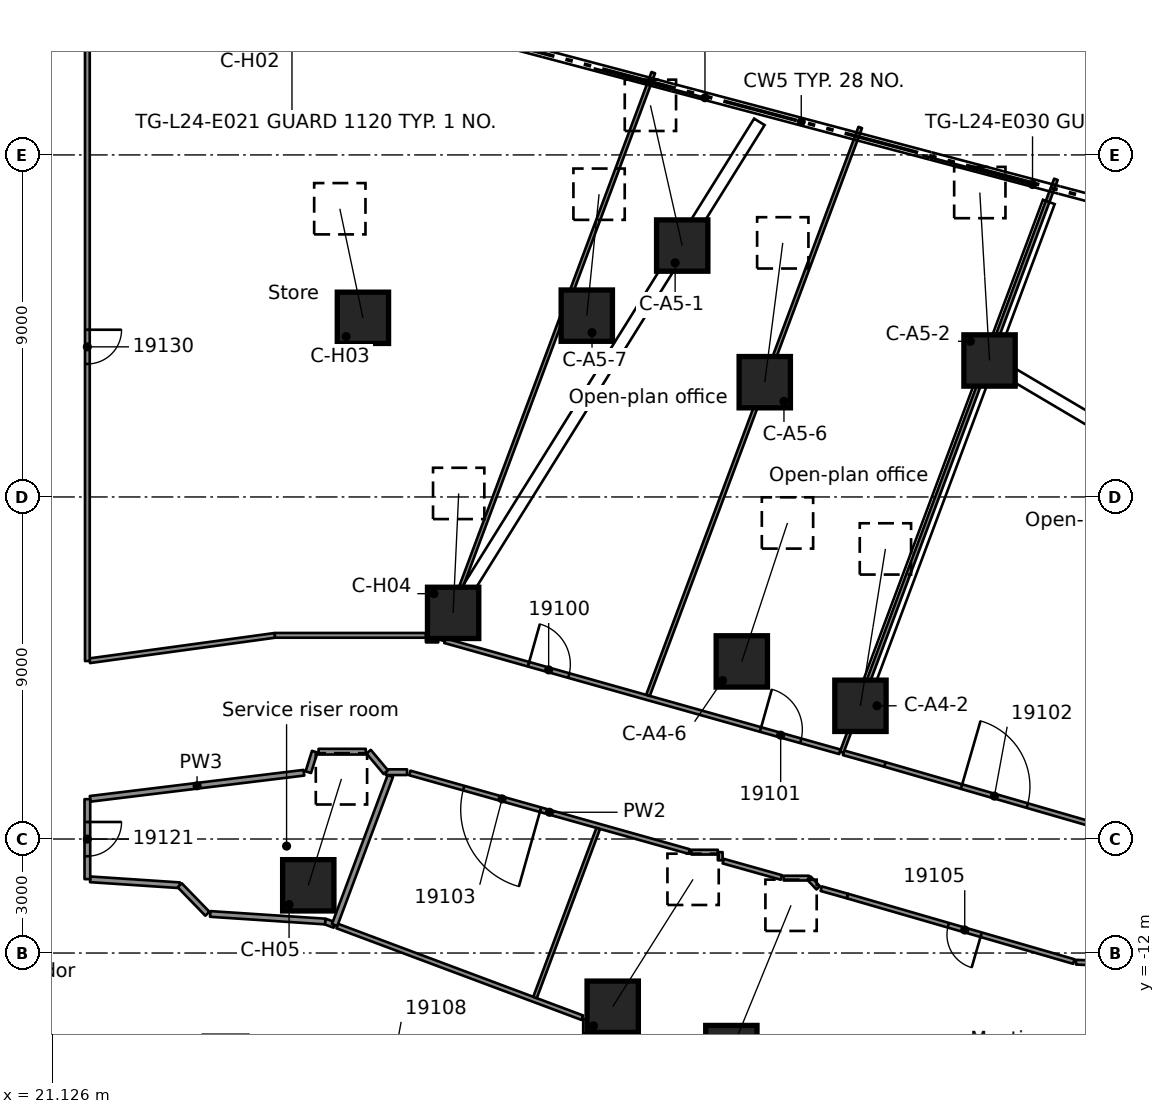
"""IFC4 building model, lengths in metres.
Left out: names, types, materials, properties, quantities, classifications, styles, units other than length and angle.
Written with IfcOpenShell. Run it as: python <this file> out.ifc"""

import sys

from ifc_helpers import new_model, si_unit, direction, frame, frame_2d, origin, origin_2d, place, context, subcontext, project, spatial, rectangle, extrude, element, fill, save


model = new_model("IFC4")
c1 = context("Model", 3, precision=1e-05, world=origin(), true_north=direction((0.0, 1.0)))
c2 = subcontext(c1, "Body", "Model", "MODEL_VIEW")
j1 = project(units=[si_unit("LENGTHUNIT", "METRE"), si_unit("PLANEANGLEUNIT", "RADIAN")], contexts=[c1])
p1 = place(None, origin())
s1 = spatial("IfcSite", under=j1, at=p1, CompositionType="ELEMENT")
p2 = place(p1, origin())
s2 = spatial("IfcBuilding", under=s1, at=p2, CompositionType="ELEMENT")
p3 = place(p2, frame((0.0, 0.0, 98.2)))
s3 = spatial("IfcBuildingStorey", under=s2, at=p3, CompositionType="ELEMENT", Elevation=98.2)
p4 = place(p3, frame((38.997, -14.58, 0.553), z_axis=(0.310782507683, 0.758869548286, 0.572303452377), x_axis=(-0.925403354822, 0.378983681555, 0.0)))
e1 = element("IfcColumn", 1, at=p4, inside=s3, PredefinedType="COLUMN", context=c2, shape_type="SweptSolid", body=[
    extrude(rectangle(XDim=1.35, YDim=1.35, at=origin_2d()), origin(), (0.0, 0.0, 1.0), 5.055),
])
p5 = place(p3, frame((47.083, -17.604, 0.589), z_axis=(0.372353666966, 0.789462395389, 0.487956835143), x_axis=(-0.904446734387, 0.42658657346, 0.0)))
e2 = element("IfcColumn", 2, at=p5, inside=s3, PredefinedType="COLUMN", context=c2, shape_type="SweptSolid", body=[
    extrude(rectangle(XDim=1.35, YDim=1.35, at=origin_2d()), origin(), (0.0, 0.0, 1.0), 5.782),
])
p6 = place(p3, frame((35.875, -13.413, 0.544), z_axis=(0.430023456329, 0.681544736858, 0.592095092589), x_axis=(-0.845727400457, 0.533615183551, 0.0)))
e3 = element("IfcColumn", 3, at=p6, inside=s3, PredefinedType="COLUMN", context=c2, shape_type="SweptSolid", body=[
    extrude(rectangle(XDim=1.35, YDim=1.35, at=origin_2d()), origin(), (0.0, 0.0, 1.0), 4.918),
])
p7 = place(p3, frame((42.394, -5.495, 0.555), z_axis=(0.129284388945, 0.812363334327, 0.568639921054), x_axis=(-0.987571860443, 0.157168128006, 0.0)))
e4 = element("IfcColumn", 4, at=p7, inside=s3, PredefinedType="COLUMN", context=c2, shape_type="SweptSolid", body=[
    extrude(rectangle(XDim=1.35, YDim=1.35, at=origin_2d()), origin(), (0.0, 0.0, 1.0), 5.082),
])
p8 = place(p3, frame((39.272, -4.327, 0.537), z_axis=(0.249154364941, 0.755002493761, 0.606542114651), x_axis=(-0.949627323304, 0.313381471748, 0.0)))
e5 = element("IfcColumn", 5, at=p8, inside=s3, PredefinedType="COLUMN", context=c2, shape_type="SweptSolid", body=[
    extrude(rectangle(XDim=1.35, YDim=1.35, at=origin_2d()), origin(), (0.0, 0.0, 1.0), 4.825),
])
p9 = place(p3, frame((37.704, 6.615, 0.533), z_axis=(-0.174865419339, 0.770754140535, 0.612666418181), x_axis=(-0.975216452063, -0.221252958457, 0.0)))
e6 = element("IfcColumn", 6, at=p9, inside=s3, PredefinedType="COLUMN", context=c2, shape_type="SweptSolid", body=[
    extrude(rectangle(XDim=1.35, YDim=1.35, at=origin_2d()), origin(), (0.0, 0.0, 1.0), 4.787),
])
p10 = place(p3, frame((45.791, 3.591, 0.567), z_axis=(-0.048562293401, 0.83791945715, 0.543629181509), x_axis=(-0.998324781517, -0.057858712476, 0.0)))
e7 = element("IfcColumn", 7, at=p10, inside=s3, PredefinedType="COLUMN", context=c2, shape_type="SweptSolid", body=[
    extrude(rectangle(XDim=1.35, YDim=1.35, at=origin_2d()), origin(), (0.0, 0.0, 1.0), 5.274),
])
p11 = place(p3, frame((39.876, 3.02, 0.528), z_axis=(0.100328455667, 0.775763177293, 0.622997346495), x_axis=(-0.991740509053, 0.128260526677, 0.0)))
e8 = element("IfcColumn", 8, at=p11, inside=s3, PredefinedType="COLUMN", context=c2, shape_type="SweptSolid", body=[
    extrude(rectangle(XDim=1.35, YDim=1.35, at=origin_2d()), origin(), (0.0, 0.0, 1.0), 4.726),
])
p12 = place(p3, frame((35.193, 4.771, 0.492), z_axis=(0.073314548038, 0.725221081003, 0.684601607298), x_axis=(-0.994928969768, 0.100580043326, 0.0)))
e9 = element("IfcColumn", 9, at=p12, inside=s3, PredefinedType="COLUMN", context=c2, shape_type="SweptSolid", body=[
    extrude(rectangle(XDim=1.35, YDim=1.35, at=origin_2d()), origin(), (0.0, 0.0, 1.0), 4.406),
])
p13 = place(p3, frame((29.302, 4.714, 0.467), z_axis=(-0.14323977711, 0.676218305191, 0.722641799218), x_axis=(-0.97829295653, -0.207226666249, 0.0)))
e10 = element("IfcColumn", 10, at=p13, inside=s3, PredefinedType="COLUMN", context=c2, shape_type="SweptSolid", body=[
    extrude(rectangle(XDim=1.35, YDim=1.35, at=origin_2d()), origin(), (0.0, 0.0, 1.0), 4.244),
])
p14 = place(p3, frame((31.676, -3.05, 0.486), z_axis=(0.03343666302, 0.719838795512, 0.693335487366), x_axis=(-0.998922931625, 0.046400179673, 0.0)))
e11 = element("IfcColumn", 11, at=p14, inside=s3, PredefinedType="COLUMN", context=c2, shape_type="SweptSolid", body=[
    extrude(rectangle(XDim=1.35, YDim=1.35, at=origin_2d()), origin(), (0.0, 0.0, 1.0), 4.366),
])
p15 = place(p3, frame((27.864, -10.218, 0.467), z_axis=(0.205700307178, 0.659955152196, 0.722597108157), x_axis=(-0.954700334487, 0.297568935425, 0.0)))
e12 = element("IfcColumn", 12, at=p15, inside=s3, PredefinedType="COLUMN", context=c2, shape_type="SweptSolid", body=[
    extrude(rectangle(XDim=1.35, YDim=1.35, at=origin_2d()), origin(), (0.0, 0.0, 1.0), 4.244),
])
p16 = place(p3, frame((28.309, -11.171, 0.0), z_axis=(0.0, 0.0, 1.0), x_axis=(0.936215410416, -0.351426671299, 0.0)))
e13 = element("IfcWall", 13, at=p16, inside=s3, PredefinedType="PARTITIONING", context=c2, shape_type="SweptSolid", body=[
    extrude(rectangle(XDim=0.265, YDim=0.15, at=frame_2d((0.132, 0.0))), origin(), (0.0, 0.0, 1.0), 3.58),
])
p17 = place(p3, frame((28.627, -11.29, 0.0), z_axis=(0.0, 0.0, 1.0), x_axis=(0.936621788465, -0.350342154718, 0.0)))
e14 = element("IfcWall", 14, at=p17, inside=s3, PredefinedType="PARTITIONING", context=c2, shape_type="SweptSolid", body=[
    extrude(rectangle(XDim=6.884, YDim=0.125, at=frame_2d((3.442, 0.0))), origin(), (0.0, 0.0, 1.0), 3.58),
])
p18 = place(p3, frame((36.276, -14.15, 0.0), z_axis=(0.0, 0.0, 1.0), x_axis=(0.936773399127, -0.349936563805, 0.0)))
e15 = element("IfcWall", 15, at=p18, inside=s3, PredefinedType="PARTITIONING", context=c2, shape_type="SweptSolid", body=[
    extrude(rectangle(XDim=2.052, YDim=0.125, at=frame_2d((1.026, 0.0))), origin(), (0.0, 0.0, 1.0), 3.58),
])
p19 = place(p3, frame((48.008, -12.224, 0.0), z_axis=(0.0, 0.0, 1.0), x_axis=(-0.960600770435, 0.277931933825, 0.0)))
e16 = element("IfcWall", 16, at=p19, inside=s3, PredefinedType="PARTITIONING", context=c2, shape_type="SweptSolid", body=[
    extrude(rectangle(XDim=6.203, YDim=0.125, at=frame_2d((3.102, 0.0))), origin(), (0.0, 0.0, 1.0), 3.58),
])
p20 = place(p19, frame((2.538, 0.0, 0.0)))
e17 = element("IfcOpeningElement", 17, at=p20, cuts=e16, PredefinedType="OPENING", context=c2, shape_type="SweptSolid", body=[
    extrude(rectangle(XDim=0.9, YDim=2.1, at=frame_2d((0.45, 1.05))), frame((0.0, 0.073, 0.0), z_axis=(0.0, -1.0, 0.0), x_axis=(1.0, 0.0, 0.0)), (0.0, 0.0, 1.0), 0.145),
])
p21 = place(p3, frame((43.037, -7.038, 0.0), z_axis=(0.0, 0.0, 1.0), x_axis=(0.960661918232, -0.277720504932, 0.0)))
e18 = element("IfcWall", 18, at=p21, inside=s3, PredefinedType="PARTITIONING", context=c2, shape_type="SweptSolid", body=[
    extrude(rectangle(XDim=6.146, YDim=0.125, at=frame_2d((3.073, 0.0))), origin(), (0.0, 0.0, 1.0), 3.58),
])
p22 = place(p21, frame((2.1, 0.0, 0.0)))
e19 = element("IfcOpeningElement", 19, at=p22, cuts=e18, PredefinedType="OPENING", context=c2, shape_type="SweptSolid", body=[
    extrude(rectangle(XDim=1.8, YDim=2.1, at=frame_2d((0.9, 1.05))), frame((0.0, 0.073, 0.0), z_axis=(0.0, -1.0, 0.0), x_axis=(1.0, 0.0, 0.0)), (0.0, 0.0, 1.0), 0.145),
])
p23 = place(p3, frame((37.886, -9.33, 0.0), z_axis=(0.0, 0.0, 1.0), x_axis=(-0.96262020384, 0.270854837798, 0.0)))
e20 = element("IfcWall", 20, at=p23, inside=s3, PredefinedType="PARTITIONING", context=c2, shape_type="SweptSolid", body=[
    extrude(rectangle(XDim=7.635, YDim=0.125, at=frame_2d((3.818, 0.0))), origin(), (0.0, 0.0, 1.0), 3.58),
])
p24 = place(p23, frame((4.063, 0.0, 0.0)))
e21 = element("IfcOpeningElement", 21, at=p24, cuts=e20, PredefinedType="OPENING", context=c2, shape_type="SweptSolid", body=[
    extrude(rectangle(XDim=2.1, YDim=2.1, at=frame_2d((1.05, 1.05))), frame((0.0, 0.073, 0.0), z_axis=(0.0, -1.0, 0.0), x_axis=(1.0, 0.0, 0.0)), (0.0, 0.0, 1.0), 0.145),
])
p25 = place(p3, frame((38.784, -9.582, 0.0), z_axis=(0.0, 0.0, 1.0), x_axis=(0.962714723357, -0.270518689617, 0.0)))
e22 = element("IfcWall", 22, at=p25, inside=s3, PredefinedType="PARTITIONING", context=c2, shape_type="SweptSolid", body=[
    extrude(rectangle(XDim=1.589, YDim=0.125, at=frame_2d((0.795, 0.0))), origin(), (0.0, 0.0, 1.0), 3.58),
])
p26 = place(p3, frame((41.363, -10.307, 0.0), z_axis=(0.0, 0.0, 1.0), x_axis=(0.962589533882, -0.270963815409, 0.0)))
e23 = element("IfcWall", 23, at=p26, inside=s3, PredefinedType="PARTITIONING", context=c2, shape_type="SweptSolid", body=[
    extrude(rectangle(XDim=0.713, YDim=0.125, at=frame_2d((0.356, 0.0))), origin(), (0.0, 0.0, 1.0), 3.58),
])
p27 = place(p3, frame((31.458, -3.782, 0.0), z_axis=(0.0, 0.0, 1.0), x_axis=(0.962639522341, -0.270786170301, 0.0)))
e24 = element("IfcWall", 24, at=p27, inside=s3, PredefinedType="PARTITIONING", context=c2, shape_type="SweptSolid", body=[
    extrude(rectangle(XDim=10.798, YDim=0.125, at=frame_2d((5.399, 0.0))), origin(), (0.0, 0.0, 1.0), 3.58),
])
p28 = place(p27, frame((2.288, 0.0, 0.0)))
e25 = element("IfcOpeningElement", 25, at=p28, cuts=e24, PredefinedType="OPENING", context=c2, shape_type="SweptSolid", body=[
    extrude(rectangle(XDim=1.1, YDim=2.1, at=frame_2d((0.55, 1.05))), frame((0.0, 0.073, 0.0), z_axis=(0.0, -1.0, 0.0), x_axis=(1.0, 0.0, 0.0)), (0.0, 0.0, 1.0), 0.145),
])
p29 = place(p27, frame((8.629, 0.0, 0.0)))
e26 = element("IfcOpeningElement", 26, at=p29, cuts=e24, PredefinedType="OPENING", context=c2, shape_type="SweptSolid", body=[
    extrude(rectangle(XDim=1.1, YDim=2.1, at=frame_2d((0.55, 1.05))), frame((0.0, 0.073, 0.0), z_axis=(0.0, -1.0, 0.0), x_axis=(1.0, 0.0, 0.0)), (0.0, 0.0, 1.0), 0.145),
])
p30 = place(p3, frame((41.949, -6.732, 0.0), z_axis=(0.0, 0.0, 1.0), x_axis=(0.962624548839, -0.270839395164, 0.0)))
e27 = element("IfcWall", 27, at=p30, inside=s3, PredefinedType="PARTITIONING", context=c2, shape_type="SweptSolid", body=[
    extrude(rectangle(XDim=1.13, YDim=0.125, at=frame_2d((0.565, 0.0))), origin(), (0.0, 0.0, 1.0), 3.58),
])
p31 = place(p3, frame((48.068, -12.241, 0.0), z_axis=(0.0, 0.0, 1.0), x_axis=(0.999033262009, -0.043960680164, 0.0)))
e28 = element("IfcWall", 28, at=p31, inside=s3, PredefinedType="PARTITIONING", context=c2, shape_type="SweptSolid", body=[
    extrude(rectangle(XDim=1.822, YDim=0.125, at=frame_2d((0.911, 0.0))), origin(), (0.0, 0.0, 1.0), 3.58),
])
p32 = place(p3, frame((25.284, -10.972, 0.0), z_axis=(0.0, 0.0, 1.0), x_axis=(0.997843913532, -0.065631731864, 0.0)))
e29 = element("IfcWall", 29, at=p32, inside=s3, PredefinedType="PARTITIONING", context=c2, shape_type="SweptSolid", body=[
    extrude(rectangle(XDim=3.032, YDim=0.15, at=frame_2d((1.516, 0.0))), origin(), (0.0, 0.0, 1.0), 3.58),
])
p33 = place(p3, frame((22.126, -10.061, 0.0), z_axis=(0.0, 0.0, 1.0), x_axis=(0.99781479722, -0.06607291766, 0.0)))
e30 = element("IfcWall", 30, at=p33, inside=s3, PredefinedType="PARTITIONING", context=c2, shape_type="SweptSolid", body=[
    extrude(rectangle(XDim=2.361, YDim=0.15, at=frame_2d((1.181, 0.0))), origin(), (0.0, 0.0, 1.0), 3.58),
])
p34 = place(p3, frame((35.224, -14.127, 0.0), z_axis=(0.0, 0.0, 1.0), x_axis=(1.0, 0.0, 0.0)))
e31 = element("IfcWall", 31, at=p34, inside=s3, PredefinedType="PARTITIONING", context=c2, shape_type="SweptSolid", body=[
    extrude(rectangle(XDim=0.991, YDim=0.125, at=frame_2d((0.496, 0.0))), origin(), (0.0, 0.0, 1.0), 3.58),
])
p35 = place(p3, frame((40.374, -10.029, 0.0), z_axis=(0.0, 0.0, 1.0), x_axis=(1.0, 0.0, 0.0)))
e32 = element("IfcWall", 32, at=p35, inside=s3, PredefinedType="PARTITIONING", context=c2, shape_type="SweptSolid", body=[
    extrude(rectangle(XDim=0.666, YDim=0.125, at=frame_2d((0.333, 0.0))), origin(), (0.0, 0.0, 1.0), 3.58),
])
p36 = place(p3, frame((37.946, -9.346, 0.0), z_axis=(0.0, 0.0, 1.0), x_axis=(1.0, 0.0, 0.0)))
e33 = element("IfcWall", 33, at=p36, inside=s3, PredefinedType="PARTITIONING", context=c2, shape_type="SweptSolid", body=[
    extrude(rectangle(XDim=0.696, YDim=0.125, at=frame_2d((0.348, 0.0))), origin(), (0.0, 0.0, 1.0), 3.58),
])
p37 = place(p3, frame((27.75, -7.256, 0.0), z_axis=(0.0, 0.0, 1.0), x_axis=(-0.992623890573, -0.121234532468, 0.0)))
e34 = element("IfcWall", 34, at=p37, inside=s3, PredefinedType="PARTITIONING", context=c2, shape_type="SweptSolid", body=[
    extrude(rectangle(XDim=5.667, YDim=0.15, at=frame_2d((2.833, 0.0))), origin(), (0.0, 0.0, 1.0), 3.58),
])
p38 = place(p3, frame((29.905, -7.242, 0.0), z_axis=(0.0, 0.0, 1.0), x_axis=(1.0, 0.0, 0.0)))
e35 = element("IfcWall", 35, at=p38, inside=s3, PredefinedType="PARTITIONING", context=c2, shape_type="SweptSolid", body=[
    extrude(rectangle(XDim=0.559, YDim=0.15, at=frame_2d((0.28, 0.0))), origin(), (0.0, 0.0, 1.0), 3.58),
])
p39 = place(p3, frame((28.135, -6.702, 0.0), z_axis=(0.0, 0.0, 1.0), x_axis=(1.0, 0.0, 0.0)))
e36 = element("IfcWall", 36, at=p39, inside=s3, PredefinedType="PARTITIONING", context=c2, shape_type="SweptSolid", body=[
    extrude(rectangle(XDim=1.242, YDim=0.15, at=frame_2d((0.621, 0.0))), origin(), (0.0, 0.0, 1.0), 3.58),
])
p40 = place(p3, frame((30.961, -3.764, 0.0), z_axis=(0.0, 0.0, 1.0), x_axis=(1.0, 0.0, 0.0)))
e37 = element("IfcWall", 37, at=p40, inside=s3, PredefinedType="PARTITIONING", context=c2, shape_type="SweptSolid", body=[
    extrude(rectangle(XDim=0.323, YDim=0.125, at=frame_2d((0.162, 0.0))), origin(), (0.0, 0.0, 1.0), 3.58),
])
p41 = place(p3, frame((26.982, -3.641, 0.0), z_axis=(0.0, 0.0, 1.0), x_axis=(1.0, 0.0, 0.0)))
e38 = element("IfcWall", 38, at=p41, inside=s3, PredefinedType="PARTITIONING", context=c2, shape_type="SweptSolid", body=[
    extrude(rectangle(XDim=3.978, YDim=0.125, at=frame_2d((1.989, 0.0))), origin(), (0.0, 0.0, 1.0), 3.58),
])
p42 = place(p3, frame((22.113, -4.309, 0.0), z_axis=(0.0, 0.0, 1.0), x_axis=(0.99074684638, 0.135722829279, 0.0)))
e39 = element("IfcWall", 39, at=p42, inside=s3, PredefinedType="PARTITIONING", context=c2, shape_type="SweptSolid", body=[
    extrude(rectangle(XDim=4.914, YDim=0.125, at=frame_2d((2.457, 0.0))), origin(), (0.0, 0.0, 1.0), 3.58),
])
p43 = place(p3, frame((41.901, -6.718, 0.0), z_axis=(0.0, 0.0, 1.0), x_axis=(0.35023728631, 0.936661007664, 0.0)))
e40 = element("IfcWall", 40, at=p43, inside=s3, PredefinedType="PARTITIONING", context=c2, shape_type="SweptSolid", body=[
    extrude(rectangle(XDim=16.095, YDim=0.1, at=frame_2d((8.048, 0.0))), origin(), (0.0, 0.0, 1.0), 3.58),
])
p44 = place(p3, frame((33.831, -13.169, 0.0), z_axis=(0.0, 0.0, 1.0), x_axis=(0.35005805829, 0.936728005253, 0.0)))
e41 = element("IfcWall", 41, at=p44, inside=s3, PredefinedType="PARTITIONING", context=c2, shape_type="SweptSolid", body=[
    extrude(rectangle(XDim=4.747, YDim=0.1, at=frame_2d((2.374, 0.0))), origin(), (0.0, 0.0, 1.0), 3.58),
])
p45 = place(p3, frame((36.803, -5.22, 0.0), z_axis=(0.0, 0.0, 1.0), x_axis=(0.350173943888, 0.936684690289, 0.0)))
e42 = element("IfcWall", 42, at=p45, inside=s3, PredefinedType="PARTITIONING", context=c2, shape_type="SweptSolid", body=[
    extrude(rectangle(XDim=15.952, YDim=0.1, at=frame_2d((7.976, 0.0))), origin(), (0.0, 0.0, 1.0), 3.58),
])
p46 = place(p3, frame((28.557, -11.264, 0.0), z_axis=(0.0, 0.0, 1.0), x_axis=(0.350228465556, 0.936664305883, 0.0)))
e43 = element("IfcWall", 43, at=p46, inside=s3, PredefinedType="PARTITIONING", context=c2, shape_type="SweptSolid", body=[
    extrude(rectangle(XDim=4.186, YDim=0.15, at=frame_2d((2.093, 0.0))), origin(), (0.0, 0.0, 1.0), 3.58),
])
p47 = place(p3, frame((31.361, -3.764, 0.0), z_axis=(0.0, 0.0, 1.0), x_axis=(0.35022519788, 0.936665527694, 0.0)))
e44 = element("IfcWall", 44, at=p47, inside=s3, PredefinedType="PARTITIONING", context=c2, shape_type="SweptSolid", body=[
    extrude(rectangle(XDim=15.938, YDim=0.1, at=frame_2d((7.969, 0.0))), origin(), (0.0, 0.0, 1.0), 3.58),
])
p48 = place(p3, frame((27.865, -7.242, 0.0), z_axis=(0.0, 0.0, 1.0), x_axis=(0.29699658102, 0.954878542466, 0.0)))
e45 = element("IfcWall", 45, at=p48, inside=s3, PredefinedType="PARTITIONING", context=c2, shape_type="SweptSolid", body=[
    extrude(rectangle(XDim=0.566, YDim=0.15, at=frame_2d((0.283, 0.0))), origin(), (0.0, 0.0, 1.0), 3.58),
])
p49 = place(p3, frame((25.209, -10.967, 0.0), z_axis=(0.0, 0.0, 1.0), x_axis=(-0.696036320716, 0.718006573956, 0.0)))
e46 = element("IfcWall", 46, at=p49, inside=s3, PredefinedType="PARTITIONING", context=c2, shape_type="SweptSolid", body=[
    extrude(rectangle(XDim=1.045, YDim=0.15, at=frame_2d((0.522, 0.0))), origin(), (0.0, 0.0, 1.0), 3.58),
])
p50 = place(p3, frame((41.282, -10.285, 0.0), z_axis=(0.0, 0.0, 1.0), x_axis=(-0.68707128389, 0.726590015658, 0.0)))
e47 = element("IfcWall", 47, at=p50, inside=s3, PredefinedType="PARTITIONING", context=c2, shape_type="SweptSolid", body=[
    extrude(rectangle(XDim=0.352, YDim=0.125, at=frame_2d((0.176, 0.0))), origin(), (0.0, 0.0, 1.0), 3.58),
])
p51 = place(p3, frame((38.704, -9.56, 0.0), z_axis=(0.0, 0.0, 1.0), x_axis=(0.0, 1.0, 0.0)))
e48 = element("IfcWall", 48, at=p51, inside=s3, PredefinedType="PARTITIONING", context=c2, shape_type="SweptSolid", body=[
    extrude(rectangle(XDim=0.214, YDim=0.125, at=frame_2d((0.107, 0.0))), origin(), (0.0, 0.0, 1.0), 3.58),
])
p52 = place(p3, frame((35.161, -14.127, 0.0), z_axis=(0.0, 0.0, 1.0), x_axis=(0.0, 1.0, 0.0)))
e49 = element("IfcWall", 49, at=p52, inside=s3, PredefinedType="PARTITIONING", context=c2, shape_type="SweptSolid", body=[
    extrude(rectangle(XDim=0.394, YDim=0.125, at=frame_2d((0.197, 0.0))), origin(), (0.0, 0.0, 1.0), 3.58),
])
p53 = place(p3, frame((29.905, -7.242, 0.0), z_axis=(0.0, 0.0, 1.0), x_axis=(-0.642769647299, 0.766059514993, 0.0)))
e50 = element("IfcWall", 50, at=p53, inside=s3, PredefinedType="PARTITIONING", context=c2, shape_type="SweptSolid", body=[
    extrude(rectangle(XDim=0.705, YDim=0.15, at=frame_2d((0.353, 0.0))), origin(), (0.0, 0.0, 1.0), 3.58),
])
p54 = place(p3, frame((22.051, -7.952, 0.0), z_axis=(0.0, 0.0, 1.0), x_axis=(0.0, -1.0, 0.0)))
e51 = element("IfcWall", 51, at=p54, inside=s3, PredefinedType="PARTITIONING", context=c2, shape_type="SweptSolid", body=[
    extrude(rectangle(XDim=2.104, YDim=0.15, at=frame_2d((1.052, 0.0))), origin(), (0.0, 0.0, 1.0), 3.58),
])
p55 = place(p54, frame((0.6, 0.0, 0.0)))
e52 = element("IfcOpeningElement", 52, at=p55, cuts=e51, PredefinedType="OPENING", context=c2, shape_type="SweptSolid", body=[
    extrude(rectangle(XDim=0.9, YDim=2.1, at=frame_2d((0.45, 1.05))), frame((0.0, 0.085, 0.0), z_axis=(0.0, -1.0, 0.0), x_axis=(1.0, 0.0, 0.0)), (0.0, 0.0, 1.0), 0.17),
])
p56 = place(p3, frame((22.051, 15.05, 0.0), z_axis=(0.0, 0.0, 1.0), x_axis=(0.0, -1.0, 0.0)))
e53 = element("IfcWall", 53, at=p56, inside=s3, PredefinedType="PARTITIONING", context=c2, shape_type="SweptSolid", body=[
    extrude(rectangle(XDim=19.367, YDim=0.125, at=frame_2d((9.684, 0.0))), origin(), (0.0, 0.0, 1.0), 3.58),
])
p57 = place(p56, frame((10.65, 0.0, 0.0)))
e54 = element("IfcOpeningElement", 54, at=p57, cuts=e53, PredefinedType="OPENING", context=c2, shape_type="SweptSolid", body=[
    extrude(rectangle(XDim=0.9, YDim=2.1, at=frame_2d((0.45, 1.05))), frame((0.0, 0.073, 0.0), z_axis=(0.0, -1.0, 0.0), x_axis=(1.0, 0.0, 0.0)), (0.0, 0.0, 1.0), 0.145),
])
p58 = place(p28, origin())
e55 = element("IfcDoor", 55, at=p58, inside=s3, OperationType="SINGLE_SWING_LEFT", PredefinedType="DOOR", context=c2, shape_type="SweptSolid", body=[
    extrude(rectangle(XDim=1.1, YDim=2.1, at=frame_2d((0.55, 1.05))), frame((0.0, 0.025, 0.0), z_axis=(0.0, -1.0, 0.0), x_axis=(1.0, 0.0, 0.0)), (0.0, 0.0, 1.0), 0.05),
])
fill(e25, e55)
p59 = place(p29, origin())
e56 = element("IfcDoor", 56, at=p59, inside=s3, OperationType="SINGLE_SWING_RIGHT", PredefinedType="DOOR", context=c2, shape_type="SweptSolid", body=[
    extrude(rectangle(XDim=1.1, YDim=2.1, at=frame_2d((0.55, 1.05))), frame((0.0, 0.025, 0.0), z_axis=(0.0, -1.0, 0.0), x_axis=(1.0, 0.0, 0.0)), (0.0, 0.0, 1.0), 0.05),
])
fill(e26, e56)
p60 = place(p22, origin())
e57 = element("IfcDoor", 57, at=p60, inside=s3, OperationType="DOUBLE_DOOR_SINGLE_SWING", PredefinedType="DOOR", context=c2, shape_type="SweptSolid", body=[
    extrude(rectangle(XDim=1.8, YDim=2.1, at=frame_2d((0.9, 1.05))), frame((0.0, 0.025, 0.0), z_axis=(0.0, -1.0, 0.0), x_axis=(1.0, 0.0, 0.0)), (0.0, 0.0, 1.0), 0.05),
])
fill(e19, e57)
p61 = place(p24, origin())
e58 = element("IfcDoor", 58, at=p61, inside=s3, OperationType="DOUBLE_DOOR_SINGLE_SWING", PredefinedType="DOOR", context=c2, shape_type="SweptSolid", body=[
    extrude(rectangle(XDim=2.1, YDim=2.1, at=frame_2d((1.05, 1.05))), frame((0.0, 0.025, 0.0), z_axis=(0.0, -1.0, 0.0), x_axis=(1.0, 0.0, 0.0)), (0.0, 0.0, 1.0), 0.05),
])
fill(e21, e58)
p62 = place(p20, origin())
e59 = element("IfcDoor", 59, at=p62, inside=s3, OperationType="SINGLE_SWING_LEFT", PredefinedType="DOOR", context=c2, shape_type="SweptSolid", body=[
    extrude(rectangle(XDim=0.9, YDim=2.1, at=frame_2d((0.45, 1.05))), frame((0.0, 0.025, 0.0), z_axis=(0.0, -1.0, 0.0), x_axis=(1.0, 0.0, 0.0)), (0.0, 0.0, 1.0), 0.05),
])
fill(e17, e59)
p63 = place(p55, origin())
e60 = element("IfcDoor", 60, at=p63, inside=s3, OperationType="SINGLE_SWING_LEFT", PredefinedType="DOOR", context=c2, shape_type="SweptSolid", body=[
    extrude(rectangle(XDim=0.9, YDim=2.1, at=frame_2d((0.45, 1.05))), frame((0.0, 0.025, 0.0), z_axis=(0.0, -1.0, 0.0), x_axis=(1.0, 0.0, 0.0)), (0.0, 0.0, 1.0), 0.05),
])
fill(e52, e60)
p64 = place(p57, origin())
e61 = element("IfcDoor", 61, at=p64, inside=s3, OperationType="SINGLE_SWING_RIGHT", PredefinedType="DOOR", context=c2, shape_type="SweptSolid", body=[
    extrude(rectangle(XDim=0.9, YDim=2.1, at=frame_2d((0.45, 1.05))), frame((0.0, 0.025, 0.0), z_axis=(0.0, -1.0, 0.0), x_axis=(1.0, 0.0, 0.0)), (0.0, 0.0, 1.0), 0.05),
])
fill(e54, e61)
save(model, sys.argv[1])
